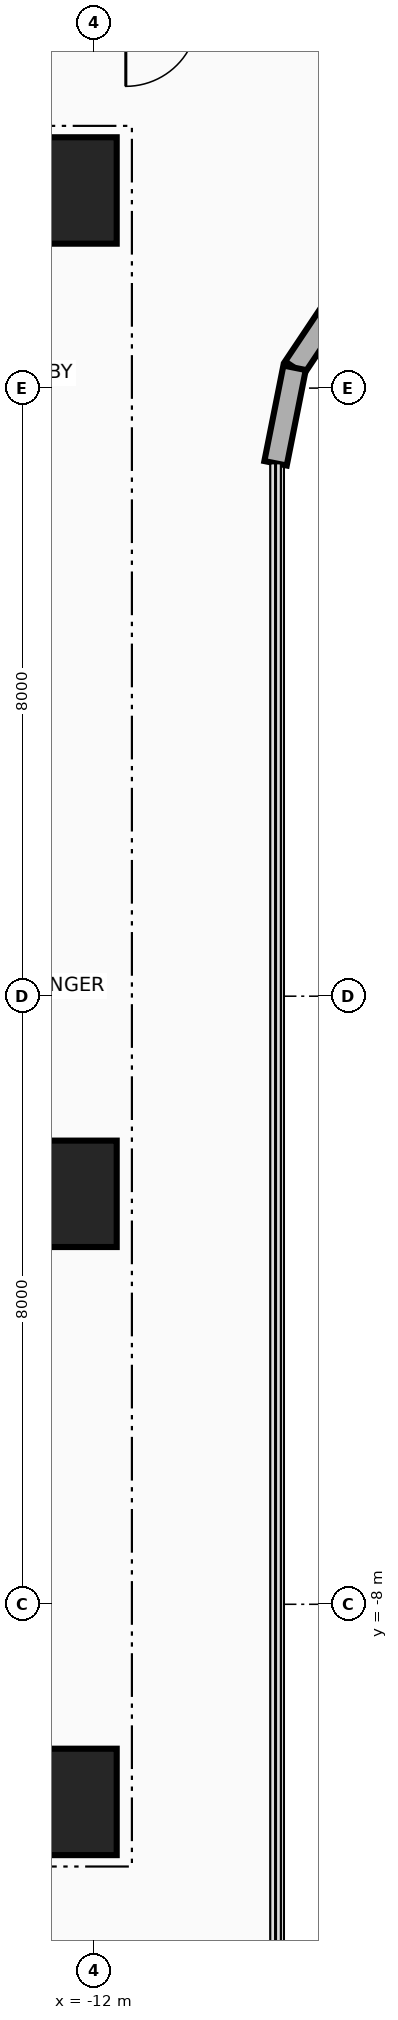
"""IFC4 building model, lengths in metres.
Left out: names, types, materials, properties, quantities, classifications, styles, units other than length and angle.
Written with IfcOpenShell. Run it as: python <this file> out.ifc"""

import sys

from ifc_helpers import new_model, si_unit, direction, frame, frame_2d, origin, origin_2d, place, context, subcontext, project, spatial, rectangle, extrude, source, transform, mapped, element, save


model = new_model("IFC4")
c1 = context("Model", 3, precision=1e-05, world=origin(), true_north=direction((0.0, 1.0)))
c2 = subcontext(c1, "Body", "Model", "MODEL_VIEW")
j1 = project(units=[si_unit("LENGTHUNIT", "METRE"), si_unit("PLANEANGLEUNIT", "RADIAN")], contexts=[c1])
p1 = place(None, origin())
s1 = spatial("IfcSite", under=j1, at=p1, CompositionType="ELEMENT")
p2 = place(p1, origin())
s2 = spatial("IfcBuilding", under=s1, at=p2, CompositionType="ELEMENT")
p3 = place(p2, frame((0.0, 0.0, 92.6)))
s3 = spatial("IfcBuildingStorey", under=s2, at=p3, CompositionType="ELEMENT", Elevation=92.6)
for number, where, z_axis, x_axis in (
    (1, (-22.65, 10.8, 0.0), (0.0, 0.0, 1.0), (1.0, 0.0, 0.0)),
    (2, (-22.65, -10.8, 0.0), (0.0, 0.0, 1.0), (1.0, 0.0, 0.0)),
):
    element("IfcWall", number, at=place(p3, frame(where, z_axis=z_axis, x_axis=x_axis)), inside=s3, PredefinedType="SHEAR", context=c2, shape_type="SweptSolid", body=[
        extrude(rectangle(XDim=10.25, YDim=0.7, at=frame_2d((5.125, 0.0))), origin(), (0.0, 0.0, 1.0), 3.46),
    ])
m1 = source(origin(), c2, "Body", "SweptSolid", [
    extrude(rectangle(XDim=1.4, YDim=1.4, at=origin_2d()), origin(), (0.0, 0.0, 1.0), 3.7),
])
for number, where, z_axis, x_axis in (
    (3, (-12.4, -10.6, 0.0), (0.0, 0.0, 1.0), (1.0, 0.0, 0.0)),
    (4, (-12.4, -2.6, 0.0), (0.0, 0.0, 1.0), (1.0, 0.0, 0.0)),
    (5, (-12.4, 10.6, 0.0), (0.0, 0.0, 1.0), (1.0, 0.0, 0.0)),
):
    element("IfcColumn", number, at=place(p3, frame(where, z_axis=z_axis, x_axis=x_axis)), inside=s3, PredefinedType="COLUMN", context=c2, shape_type="MappedRepresentation", body=[
        mapped(m1, transform((0.0, 0.0, 0.0), x_axis=(1.0, 0.0, 0.0), y_axis=(0.0, 1.0, 0.0), z_axis=(0.0, 0.0, 1.0), scale=1.0)),
    ])
p4 = place(p3, frame((-8.642, 9.342, 0.0), z_axis=(0.0, 0.0, 1.0), x_axis=(-0.555615398575, -0.831439431869, 0.0)))
e6 = element("IfcWall", 6, at=p4, inside=s3, PredefinedType="SOLIDWALL", context=c2, shape_type="SweptSolid", body=[
    extrude(rectangle(XDim=1.292, YDim=0.3, at=frame_2d((0.646, 0.0))), origin(), (0.0, 0.0, 1.0), 3.46),
])
p5 = place(p3, frame((-9.36, 8.268, 0.0), z_axis=(0.0, 0.0, 1.0), x_axis=(-0.195090163074, -0.980785312019, 0.0)))
e7 = element("IfcWall", 7, at=p5, inside=s3, PredefinedType="SOLIDWALL", context=c2, shape_type="SweptSolid", body=[
    extrude(rectangle(XDim=1.281, YDim=0.3, at=frame_2d((0.641, 0.0))), origin(), (0.0, 0.0, 1.0), 3.46),
])
save(model, sys.argv[1])
